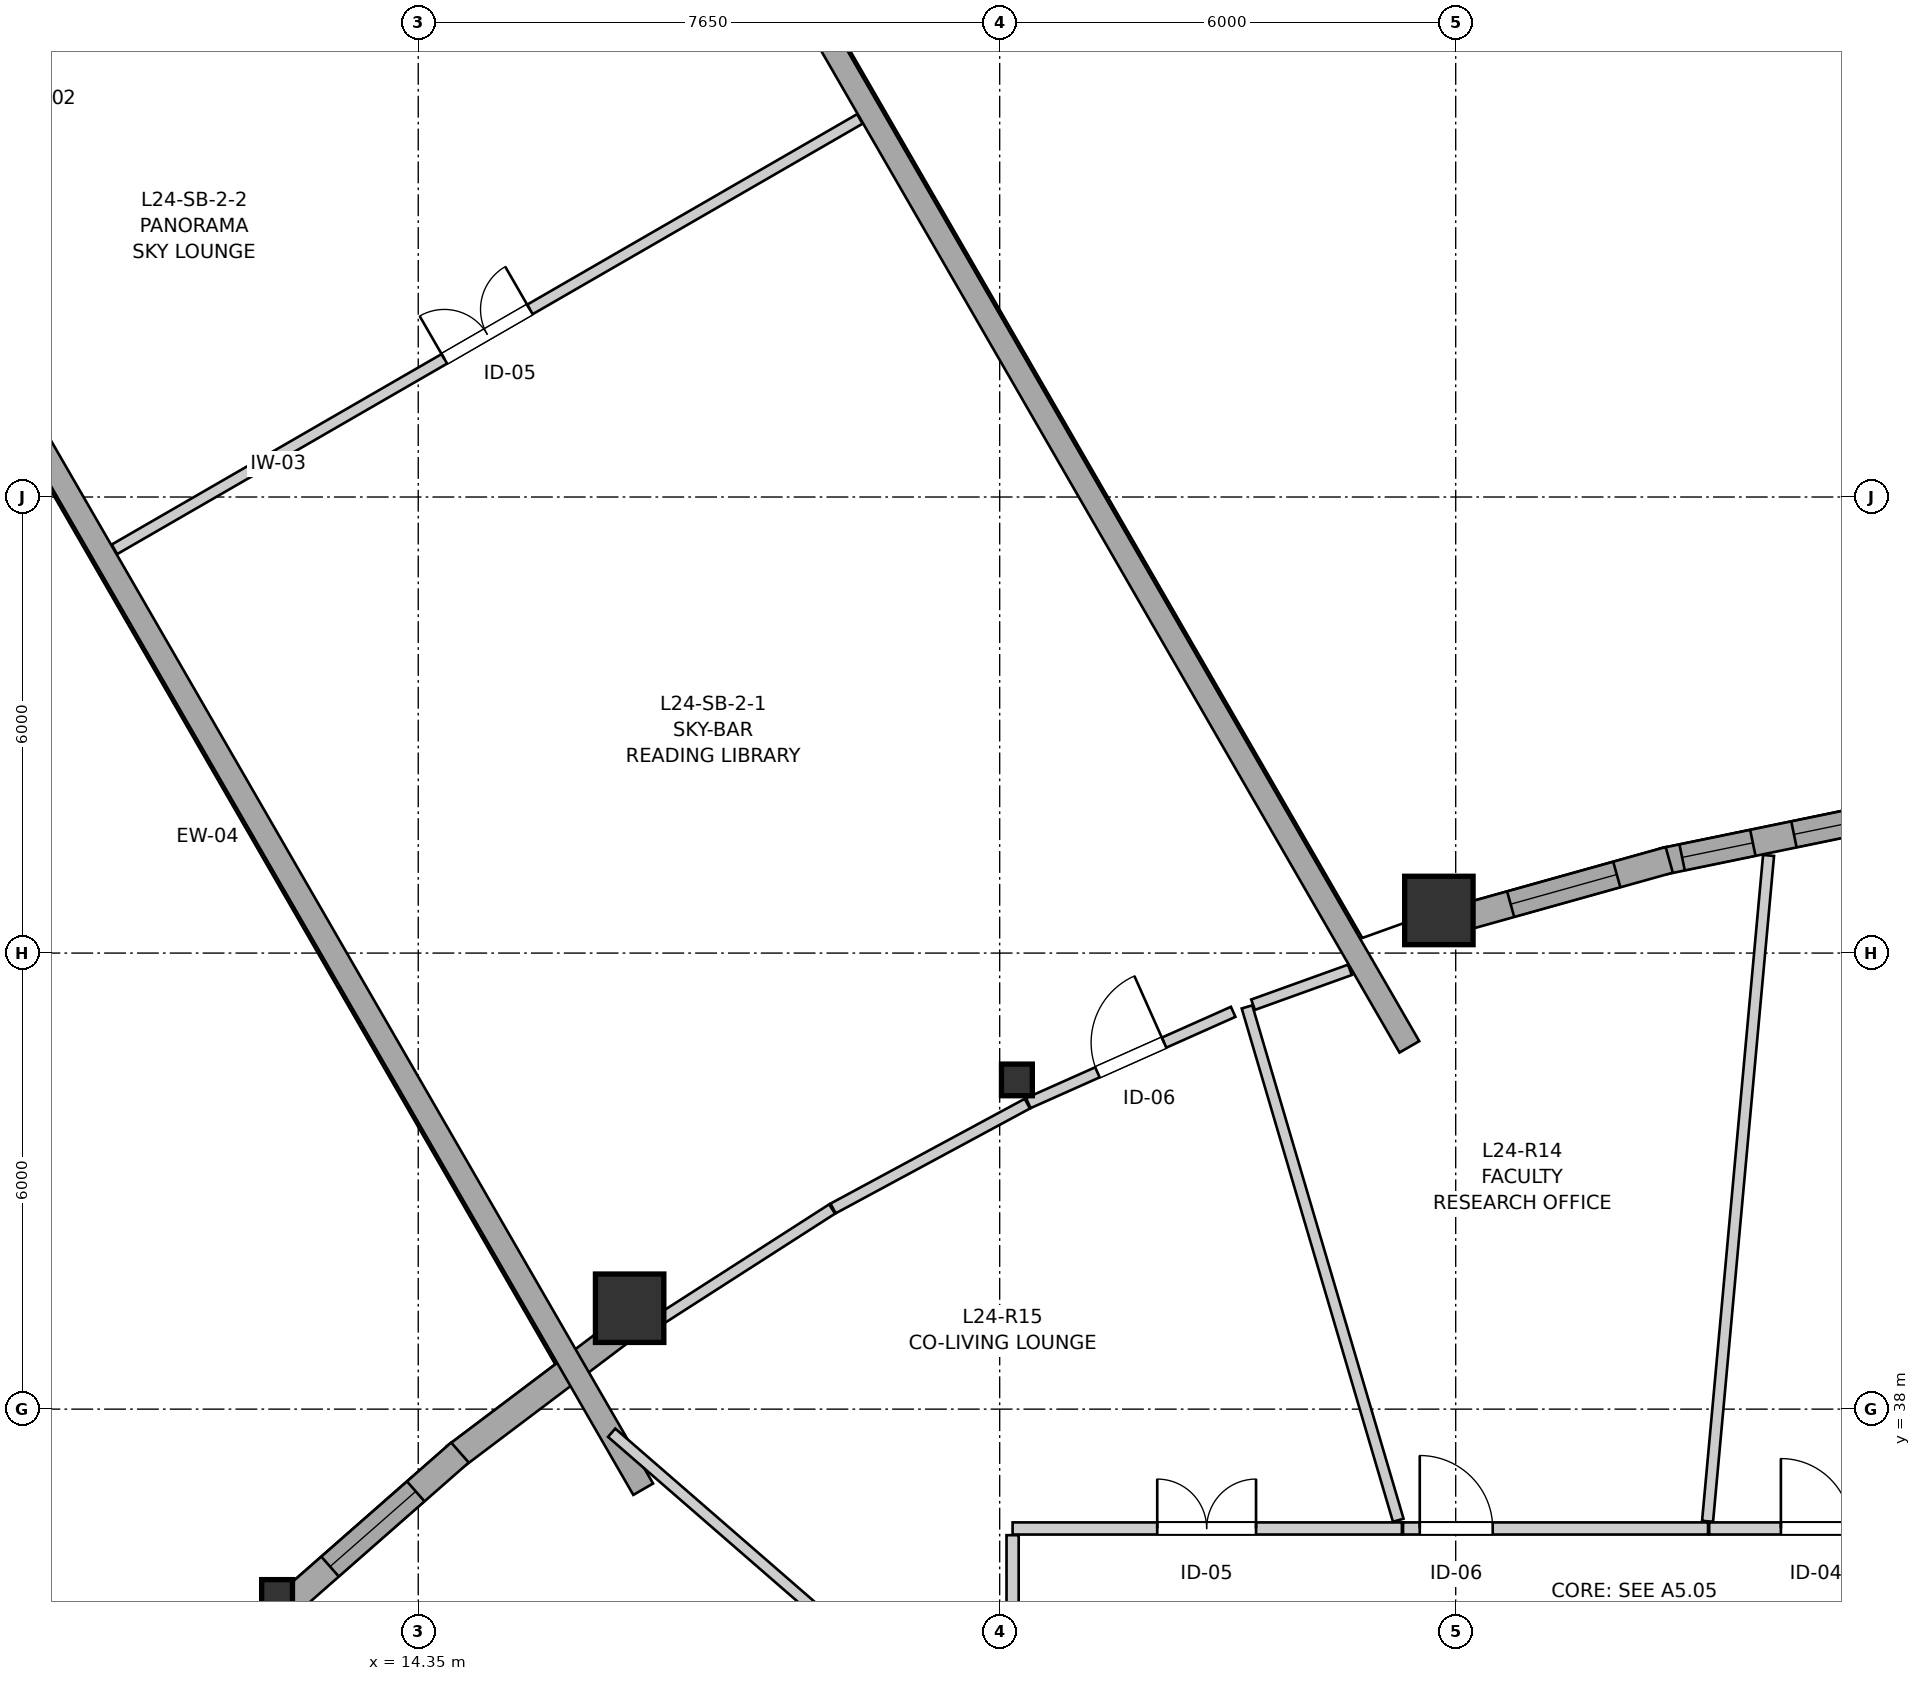
"""IFC4 building model, lengths in metres.
Left out: names, types, materials, properties, quantities, classifications, styles, units other than length and angle.
Written with IfcOpenShell. Run it as: python <this file> out.ifc"""

import sys

from ifc_helpers import new_model, si_unit, direction, frame, frame_2d, origin, origin_2d, place, context, subcontext, project, spatial, rectangle, i_section, extrude, source, transform, mapped, element, fill, save


model = new_model("IFC4")
c1 = context("Model", 3, precision=1e-05, world=origin(), true_north=direction((0.0, 1.0)))
c2 = subcontext(c1, "Body", "Model", "MODEL_VIEW")
j1 = project(units=[si_unit("LENGTHUNIT", "METRE"), si_unit("PLANEANGLEUNIT", "RADIAN")], contexts=[c1])
p1 = place(None, origin())
s1 = spatial("IfcSite", under=j1, at=p1, CompositionType="ELEMENT")
p2 = place(p1, origin())
s2 = spatial("IfcBuilding", under=s1, at=p2, CompositionType="ELEMENT")
p3 = place(p2, frame((0.0, 0.0, 83.2)))
s3 = spatial("IfcBuildingStorey", under=s2, at=p3, CompositionType="ELEMENT", Elevation=83.2)
m1 = source(origin(), c2, "Body", "SweptSolid", [
    extrude(rectangle(XDim=0.9, YDim=0.9, at=origin_2d()), origin(), (0.0, 0.0, 1.0), 2.935),
])
p4 = place(p3, frame((27.779, 44.561, 0.0), z_axis=(0.0, 0.0, 1.0), x_axis=(1.0, 0.0, 0.0)))
e1 = element("IfcColumn", 1, at=p4, inside=s3, PredefinedType="COLUMN", context=c2, shape_type="MappedRepresentation", body=[
    mapped(m1, transform((0.0, 0.0, 0.0), x_axis=(1.0, 0.0, 0.0), y_axis=(0.0, 1.0, 0.0), z_axis=(0.0, 0.0, 1.0), scale=1.0)),
])
m2 = source(origin(), c2, "Body", "SweptSolid", [
    extrude(i_section(OverallWidth=0.406, OverallDepth=0.416, WebThickness=0.027, FlangeThickness=0.044, FilletRadius=0.015, at=origin_2d()), origin(), (0.0, 0.0, 1.0), 2.935),
])
p5 = place(p3, frame((22.227, 42.331, 0.0), z_axis=(0.0, 0.0, 1.0), x_axis=(1.0, 0.0, 0.0)))
e2 = element("IfcColumn", 2, at=p5, inside=s3, PredefinedType="PILASTER", context=c2, shape_type="MappedRepresentation", body=[
    mapped(m2, transform((0.0, 0.0, 0.0), x_axis=(1.0, 0.0, 0.0), y_axis=(0.0, 1.0, 0.0), z_axis=(0.0, 0.0, 1.0), scale=1.0)),
])
p6 = place(p3, frame((17.131, 39.327, 0.0), z_axis=(0.0, 0.0, 1.0), x_axis=(1.0, 0.0, 0.0)))
e3 = element("IfcColumn", 3, at=p6, inside=s3, PredefinedType="COLUMN", context=c2, shape_type="MappedRepresentation", body=[
    mapped(m1, transform((0.0, 0.0, 0.0), x_axis=(1.0, 0.0, 0.0), y_axis=(0.0, 1.0, 0.0), z_axis=(0.0, 0.0, 1.0), scale=1.0)),
])
p7 = place(p3, frame((12.493, 35.549, 0.0), z_axis=(0.0, 0.0, 1.0), x_axis=(1.0, 0.0, 0.0)))
e4 = element("IfcColumn", 4, at=p7, inside=s3, PredefinedType="PILASTER", context=c2, shape_type="MappedRepresentation", body=[
    mapped(m2, transform((0.0, 0.0, 0.0), x_axis=(1.0, 0.0, 0.0), y_axis=(0.0, 1.0, 0.0), z_axis=(0.0, 0.0, 1.0), scale=1.0)),
])
p8 = place(p3, frame((33.803, 45.84, 0.0), z_axis=(0.0, 0.0, 1.0), x_axis=(-0.97943222174, -0.201773444777, 0.0)))
e5 = element("IfcWall", 5, at=p8, inside=s3, PredefinedType="SOLIDWALL", context=c2, shape_type="SweptSolid", body=[
    extrude(rectangle(XDim=3.144, YDim=0.35, at=frame_2d((1.572, 0.0))), origin(), (0.0, 0.0, 1.0), 2.465),
])
p9 = place(p8, frame((0.431, 0.0, 0.82)))
e6 = element("IfcOpeningElement", 6, at=p9, cuts=e5, PredefinedType="OPENING", context=c2, shape_type="SweptSolid", body=[
    extrude(rectangle(XDim=0.95, YDim=1.35, at=frame_2d((0.475, 0.675))), frame((0.0, 0.185, 0.0), z_axis=(0.0, -1.0, 0.0), x_axis=(1.0, 0.0, 0.0)), (0.0, 0.0, 1.0), 0.37),
])
p10 = place(p8, frame((1.933, 0.0, 0.82)))
e7 = element("IfcOpeningElement", 7, at=p10, cuts=e5, PredefinedType="OPENING", context=c2, shape_type="SweptSolid", body=[
    extrude(rectangle(XDim=0.95, YDim=1.35, at=frame_2d((0.475, 0.675))), frame((0.0, 0.185, 0.0), z_axis=(0.0, -1.0, 0.0), x_axis=(1.0, 0.0, 0.0)), (0.0, 0.0, 1.0), 0.37),
])
p11 = place(p3, frame((30.809, 45.227, 0.0), z_axis=(0.0, 0.0, 1.0), x_axis=(-0.963041637143, -0.269352566591, 0.0)))
e8 = element("IfcWall", 8, at=p11, inside=s3, PredefinedType="SOLIDWALL", context=c2, shape_type="SweptSolid", body=[
    extrude(rectangle(XDim=2.873, YDim=0.35, at=frame_2d((1.437, 0.0))), origin(), (0.0, 0.0, 1.0), 2.465),
])
p12 = place(p11, frame((0.717, 0.0, 0.82)))
e9 = element("IfcOpeningElement", 9, at=p12, cuts=e8, PredefinedType="OPENING", context=c2, shape_type="SweptSolid", body=[
    extrude(rectangle(XDim=1.45, YDim=1.25, at=frame_2d((0.725, 0.625))), frame((0.0, 0.185, 0.0), z_axis=(0.0, -1.0, 0.0), x_axis=(1.0, 0.0, 0.0)), (0.0, 0.0, 1.0), 0.37),
])
p13 = place(p3, frame((17.057, 39.052, 0.0), z_axis=(0.0, 0.0, 1.0), x_axis=(-0.798379678642, -0.602154372841, 0.0)))
e10 = element("IfcWall", 10, at=p13, inside=s3, PredefinedType="SOLIDWALL", context=c2, shape_type="SweptSolid", body=[
    extrude(rectangle(XDim=2.79, YDim=0.35, at=frame_2d((1.395, 0.0))), origin(), (0.0, 0.0, 1.0), 2.465),
])
p14 = place(p3, frame((14.899, 37.429, 0.0), z_axis=(0.0, 0.0, 1.0), x_axis=(-0.751526984469, -0.659702350773, 0.0)))
e11 = element("IfcWall", 11, at=p14, inside=s3, PredefinedType="SOLIDWALL", context=c2, shape_type="SweptSolid", body=[
    extrude(rectangle(XDim=3.028, YDim=0.35, at=frame_2d((1.514, 0.0))), origin(), (0.0, 0.0, 1.0), 2.465),
])
p15 = place(p14, frame((0.774, 0.0, 0.82)))
e12 = element("IfcOpeningElement", 12, at=p15, cuts=e11, PredefinedType="OPENING", context=c2, shape_type="SweptSolid", body=[
    extrude(rectangle(XDim=1.5, YDim=1.45, at=frame_2d((0.75, 0.725))), frame((0.0, 0.185, 0.0), z_axis=(0.0, -1.0, 0.0), x_axis=(1.0, 0.0, 0.0)), (0.0, 0.0, 1.0), 0.37),
])
p16 = place(p3, frame((12.603, 35.412, 0.0), z_axis=(0.0, 0.0, 1.0), x_axis=(-0.701972782373, -0.71220377197, 0.0)))
e13 = element("IfcWall", 13, at=p16, inside=s3, PredefinedType="SOLIDWALL", context=c2, shape_type="SweptSolid", body=[
    extrude(rectangle(XDim=3.078, YDim=0.35, at=frame_2d((1.539, 0.0))), origin(), (0.0, 0.0, 1.0), 2.465),
])
p17 = place(p16, frame((0.854, 0.0, 0.82)))
e14 = element("IfcOpeningElement", 14, at=p17, cuts=e13, PredefinedType="OPENING", context=c2, shape_type="SweptSolid", body=[
    extrude(rectangle(XDim=1.35, YDim=1.45, at=frame_2d((0.675, 0.725))), frame((0.0, 0.185, 0.0), z_axis=(0.0, -1.0, 0.0), x_axis=(1.0, 0.0, 0.0)), (0.0, 0.0, 1.0), 0.37),
])
for number, where, z_axis, x_axis in (
    (15, (17.31, 36.946, 0.0), (0.0, 0.0, 1.0), (-0.5, 0.866, 0.0)),
    (16, (27.39, 42.766, 0.0), (0.0, 0.0, 1.0), (-0.5, 0.866, 0.0)),
):
    element("IfcWall", number, at=place(p3, frame(where, z_axis=z_axis, x_axis=x_axis)), inside=s3, PredefinedType="SOLIDWALL", context=c2, shape_type="SweptSolid", body=[
        extrude(rectangle(XDim=20.603, YDim=0.3, at=frame_2d((10.302, 0.0))), origin(), (0.0, 0.0, 1.0), 2.115),
    ])
p18 = place(p3, frame((10.353, 49.312, 0.0), z_axis=(0.0, 0.0, 1.0), x_axis=(0.866036235619, 0.499981238243, 0.0)))
e17 = element("IfcWall", 17, at=p18, inside=s3, PredefinedType="PARTITIONING", context=c2, shape_type="SweptSolid", body=[
    extrude(rectangle(XDim=11.324, YDim=0.145, at=frame_2d((5.662, 0.0))), origin(), (0.0, 0.0, 1.0), 2.353),
])
p19 = place(p18, frame((5.012, 0.0, 0.0)))
e18 = element("IfcOpeningElement", 18, at=p19, cuts=e17, PredefinedType="OPENING", context=c2, shape_type="SweptSolid", body=[
    extrude(rectangle(XDim=1.3, YDim=2.1, at=frame_2d((0.65, 1.05))), frame((0.0, 0.083, 0.0), z_axis=(0.0, -1.0, 0.0), x_axis=(1.0, 0.0, 0.0)), (0.0, 0.0, 1.0), 0.165),
])
p20 = place(p3, frame((22.17, 36.43, 0.0), z_axis=(0.0, 0.0, 1.0), x_axis=(1.0, 0.0, 0.0)))
e19 = element("IfcWall", 19, at=p20, inside=s3, PredefinedType="PARTITIONING", context=c2, shape_type="SweptSolid", body=[
    extrude(rectangle(XDim=5.122, YDim=0.16, at=frame_2d((2.561, 0.0))), origin(), (0.0, 0.0, 1.0), 2.573),
])
p21 = place(p20, frame((1.903, 0.0, 0.0)))
e20 = element("IfcOpeningElement", 20, at=p21, cuts=e19, PredefinedType="OPENING", context=c2, shape_type="SweptSolid", body=[
    extrude(rectangle(XDim=1.3, YDim=2.1, at=frame_2d((0.65, 1.05))), frame((0.0, 0.09, 0.0), z_axis=(0.0, -1.0, 0.0), x_axis=(1.0, 0.0, 0.0)), (0.0, 0.0, 1.0), 0.18),
])
p22 = place(p3, frame((27.307, 36.43, 0.0), z_axis=(0.0, 0.0, 1.0), x_axis=(1.0, 0.0, 0.0)))
e21 = element("IfcWall", 21, at=p22, inside=s3, PredefinedType="PARTITIONING", context=c2, shape_type="SweptSolid", body=[
    extrude(rectangle(XDim=4.013, YDim=0.16, at=frame_2d((2.007, 0.0))), origin(), (0.0, 0.0, 1.0), 2.935),
])
p23 = place(p22, frame((0.22, 0.0, 0.0)))
e22 = element("IfcOpeningElement", 22, at=p23, cuts=e21, PredefinedType="OPENING", context=c2, shape_type="SweptSolid", body=[
    extrude(rectangle(XDim=0.96, YDim=2.1, at=frame_2d((0.48, 1.05))), frame((0.0, 0.09, 0.0), z_axis=(0.0, -1.0, 0.0), x_axis=(1.0, 0.0, 0.0)), (0.0, 0.0, 1.0), 0.18),
])
p24 = place(p3, frame((22.377, 42.026, 0.0), z_axis=(0.0, 0.0, 1.0), x_axis=(0.913387960111, 0.407090204162, 0.0)))
e23 = element("IfcWall", 23, at=p24, inside=s3, PredefinedType="PARTITIONING", context=c2, shape_type="SweptSolid", body=[
    extrude(rectangle(XDim=2.951, YDim=0.145, at=frame_2d((1.475, 0.0))), origin(), (0.0, 0.0, 1.0), 2.453),
])
p25 = place(p24, frame((0.995, 0.0, 0.0)))
e24 = element("IfcOpeningElement", 24, at=p25, cuts=e23, PredefinedType="OPENING", context=c2, shape_type="SweptSolid", body=[
    extrude(rectangle(XDim=0.96, YDim=2.1, at=frame_2d((0.48, 1.05))), frame((0.0, 0.083, 0.0), z_axis=(0.0, -1.0, 0.0), x_axis=(1.0, 0.0, 0.0)), (0.0, 0.0, 1.0), 0.165),
])
p26 = place(p3, frame((31.335, 36.43, 0.0), z_axis=(0.0, 0.0, 1.0), x_axis=(1.0, 0.0, 0.0)))
e25 = element("IfcWall", 25, at=p26, inside=s3, PredefinedType="PARTITIONING", context=c2, shape_type="SweptSolid", body=[
    extrude(rectangle(XDim=2.806, YDim=0.16, at=frame_2d((1.403, 0.0))), origin(), (0.0, 0.0, 1.0), 2.935),
])
p27 = place(p26, frame((0.944, 0.0, 0.0)))
e26 = element("IfcOpeningElement", 26, at=p27, cuts=e25, PredefinedType="OPENING", context=c2, shape_type="SweptSolid", body=[
    extrude(rectangle(XDim=0.92, YDim=2.1, at=frame_2d((0.46, 1.05))), frame((0.0, 0.09, 0.0), z_axis=(0.0, -1.0, 0.0), x_axis=(1.0, 0.0, 0.0)), (0.0, 0.0, 1.0), 0.18),
])
p28 = place(p3, frame((31.314, 36.525, 0.0), z_axis=(0.0, 0.0, 1.0), x_axis=(0.091226381691, 0.995830179942, 0.0)))
e27 = element("IfcWall", 27, at=p28, inside=s3, PredefinedType="PARTITIONING", context=c2, shape_type="SweptSolid", body=[
    extrude(rectangle(XDim=8.797, YDim=0.145, at=frame_2d((4.398, 0.0))), origin(), (0.0, 0.0, 1.0), 2.935),
])
p29 = place(p3, frame((16.895, 37.69, 0.0), z_axis=(0.0, 0.0, 1.0), x_axis=(0.754854710059, -0.655892038907, 0.0)))
e28 = element("IfcWall", 28, at=p29, inside=s3, PredefinedType="PARTITIONING", context=c2, shape_type="SweptSolid", body=[
    extrude(rectangle(XDim=6.811, YDim=0.145, at=frame_2d((3.406, 0.0))), origin(), (0.0, 0.0, 1.0), 2.103),
])
p30 = place(p3, frame((25.254, 43.292, 0.0), z_axis=(0.0, 0.0, 1.0), x_axis=(0.282661880608, -0.959219610543, 0.0)))
e29 = element("IfcWall", 29, at=p30, inside=s3, PredefinedType="PARTITIONING", context=c2, shape_type="SweptSolid", body=[
    extrude(rectangle(XDim=7.041, YDim=0.145, at=frame_2d((3.521, 0.0))), origin(), (0.0, 0.0, 1.0), 2.935),
])
p31 = place(p3, frame((22.17, 33.315, 0.0), z_axis=(0.0, 0.0, 1.0), x_axis=(0.0, 1.0, 0.0)))
e30 = element("IfcWall", 30, at=p31, inside=s3, PredefinedType="PARTITIONING", context=c2, shape_type="SweptSolid", body=[
    extrude(rectangle(XDim=3.027, YDim=0.16, at=frame_2d((1.514, 0.0))), origin(), (0.0, 0.0, 1.0), 2.935),
])
p32 = place(p3, frame((17.326, 39.048, 0.0), z_axis=(0.0, 0.0, 1.0), x_axis=(0.841527071554, 0.540214945963, 0.0)))
e31 = element("IfcWall", 31, at=p32, inside=s3, PredefinedType="PARTITIONING", context=c2, shape_type="SweptSolid", body=[
    extrude(rectangle(XDim=2.934, YDim=0.145, at=frame_2d((1.467, 0.0))), origin(), (0.0, 0.0, 1.0), 2.453),
])
p33 = place(p3, frame((19.808, 40.64, 0.0), z_axis=(0.0, 0.0, 1.0), x_axis=(0.880106382364, 0.474776532404, 0.0)))
e32 = element("IfcWall", 32, at=p33, inside=s3, PredefinedType="PARTITIONING", context=c2, shape_type="SweptSolid", body=[
    extrude(rectangle(XDim=2.904, YDim=0.145, at=frame_2d((1.452, 0.0))), origin(), (0.0, 0.0, 1.0), 2.453),
])
p34 = place(p3, frame((25.334, 43.321, 0.0), z_axis=(0.0, 0.0, 1.0), x_axis=(0.940956330278, 0.3385279671, 0.0)))
e33 = element("IfcWall", 33, at=p34, inside=s3, PredefinedType="PARTITIONING", context=c2, shape_type="SweptSolid", body=[
    extrude(rectangle(XDim=1.354, YDim=0.145, at=frame_2d((0.677, 0.0))), origin(), (0.0, 0.0, 1.0), 2.453),
])
m3 = source(origin(), c2, "Body", "SweptSolid", [
    extrude(rectangle(XDim=0.95, YDim=1.35, at=frame_2d((0.475, 0.675))), frame((0.0, 0.03, 0.0), z_axis=(0.0, -1.0, 0.0), x_axis=(1.0, 0.0, 0.0)), (0.0, 0.0, 1.0), 0.06),
])
p35 = place(p9, origin())
e34 = element("IfcWindow", 34, at=p35, inside=s3, PartitioningType="SINGLE_PANEL", PredefinedType="WINDOW", context=c2, shape_type="MappedRepresentation", body=[
    mapped(m3, transform((0.0, 0.0, 0.0), x_axis=(1.0, 0.0, 0.0), y_axis=(0.0, 1.0, 0.0), z_axis=(0.0, 0.0, 1.0), scale=1.0)),
])
fill(e6, e34)
p36 = place(p10, origin())
e35 = element("IfcWindow", 35, at=p36, inside=s3, PartitioningType="SINGLE_PANEL", PredefinedType="WINDOW", context=c2, shape_type="MappedRepresentation", body=[
    mapped(m3, transform((0.0, 0.0, 0.0), x_axis=(1.0, 0.0, 0.0), y_axis=(0.0, 1.0, 0.0), z_axis=(0.0, 0.0, 1.0), scale=1.0)),
])
fill(e7, e35)
m4 = source(origin(), c2, "Body", "SweptSolid", [
    extrude(rectangle(XDim=1.45, YDim=1.25, at=frame_2d((0.725, 0.625))), frame((0.0, 0.03, 0.0), z_axis=(0.0, -1.0, 0.0), x_axis=(1.0, 0.0, 0.0)), (0.0, 0.0, 1.0), 0.06),
])
p37 = place(p12, origin())
e36 = element("IfcWindow", 36, at=p37, inside=s3, PartitioningType="SINGLE_PANEL", PredefinedType="WINDOW", context=c2, shape_type="MappedRepresentation", body=[
    mapped(m4, transform((0.0, 0.0, 0.0), x_axis=(1.0, 0.0, 0.0), y_axis=(0.0, 1.0, 0.0), z_axis=(0.0, 0.0, 1.0), scale=1.0)),
])
fill(e9, e36)
m5 = source(origin(), c2, "Body", "SweptSolid", [
    extrude(rectangle(XDim=1.5, YDim=1.45, at=frame_2d((0.75, 0.725))), frame((0.0, 0.03, 0.0), z_axis=(0.0, -1.0, 0.0), x_axis=(1.0, 0.0, 0.0)), (0.0, 0.0, 1.0), 0.06),
])
p38 = place(p15, origin())
e37 = element("IfcWindow", 37, at=p38, inside=s3, PartitioningType="SINGLE_PANEL", PredefinedType="WINDOW", context=c2, shape_type="MappedRepresentation", body=[
    mapped(m5, transform((0.0, 0.0, 0.0), x_axis=(1.0, 0.0, 0.0), y_axis=(0.0, 1.0, 0.0), z_axis=(0.0, 0.0, 1.0), scale=1.0)),
])
fill(e12, e37)
m6 = source(origin(), c2, "Body", "SweptSolid", [
    extrude(rectangle(XDim=1.3, YDim=2.1, at=frame_2d((0.65, 1.05))), frame((0.0, 0.025, 0.0), z_axis=(0.0, -1.0, 0.0), x_axis=(1.0, 0.0, 0.0)), (0.0, 0.0, 1.0), 0.05),
])
p39 = place(p19, origin())
e38 = element("IfcDoor", 38, at=p39, inside=s3, OperationType="DOUBLE_DOOR_SINGLE_SWING", PredefinedType="DOOR", context=c2, shape_type="MappedRepresentation", body=[
    mapped(m6, transform((0.0, 0.0, 0.0), x_axis=(1.0, 0.0, 0.0), y_axis=(0.0, 1.0, 0.0), z_axis=(0.0, 0.0, 1.0), scale=1.0)),
])
fill(e18, e38)
p40 = place(p21, origin())
e39 = element("IfcDoor", 39, at=p40, inside=s3, OperationType="DOUBLE_DOOR_SINGLE_SWING", PredefinedType="DOOR", context=c2, shape_type="MappedRepresentation", body=[
    mapped(m6, transform((0.0, 0.0, 0.0), x_axis=(1.0, 0.0, 0.0), y_axis=(0.0, 1.0, 0.0), z_axis=(0.0, 0.0, 1.0), scale=1.0)),
])
fill(e20, e39)
m7 = source(origin(), c2, "Body", "SweptSolid", [
    extrude(rectangle(XDim=0.96, YDim=2.1, at=frame_2d((0.48, 1.05))), frame((0.0, 0.025, 0.0), z_axis=(0.0, -1.0, 0.0), x_axis=(1.0, 0.0, 0.0)), (0.0, 0.0, 1.0), 0.05),
])
p41 = place(p23, origin())
e40 = element("IfcDoor", 40, at=p41, inside=s3, OperationType="SINGLE_SWING_LEFT", PredefinedType="DOOR", context=c2, shape_type="MappedRepresentation", body=[
    mapped(m7, transform((0.0, 0.0, 0.0), x_axis=(1.0, 0.0, 0.0), y_axis=(0.0, 1.0, 0.0), z_axis=(0.0, 0.0, 1.0), scale=1.0)),
])
fill(e22, e40)
p42 = place(p25, origin())
e41 = element("IfcDoor", 41, at=p42, inside=s3, OperationType="SINGLE_SWING_RIGHT", PredefinedType="DOOR", context=c2, shape_type="MappedRepresentation", body=[
    mapped(m7, transform((0.0, 0.0, 0.0), x_axis=(1.0, 0.0, 0.0), y_axis=(0.0, 1.0, 0.0), z_axis=(0.0, 0.0, 1.0), scale=1.0)),
])
fill(e24, e41)
m8 = source(origin(), c2, "Body", "SweptSolid", [
    extrude(rectangle(XDim=0.92, YDim=2.1, at=frame_2d((0.46, 1.05))), frame((0.0, 0.025, 0.0), z_axis=(0.0, -1.0, 0.0), x_axis=(1.0, 0.0, 0.0)), (0.0, 0.0, 1.0), 0.05),
])
p43 = place(p27, origin())
e42 = element("IfcDoor", 42, at=p43, inside=s3, OperationType="SINGLE_SWING_LEFT", PredefinedType="DOOR", context=c2, shape_type="MappedRepresentation", body=[
    mapped(m8, transform((0.0, 0.0, 0.0), x_axis=(1.0, 0.0, 0.0), y_axis=(0.0, 1.0, 0.0), z_axis=(0.0, 0.0, 1.0), scale=1.0)),
])
fill(e26, e42)
save(model, sys.argv[1])
